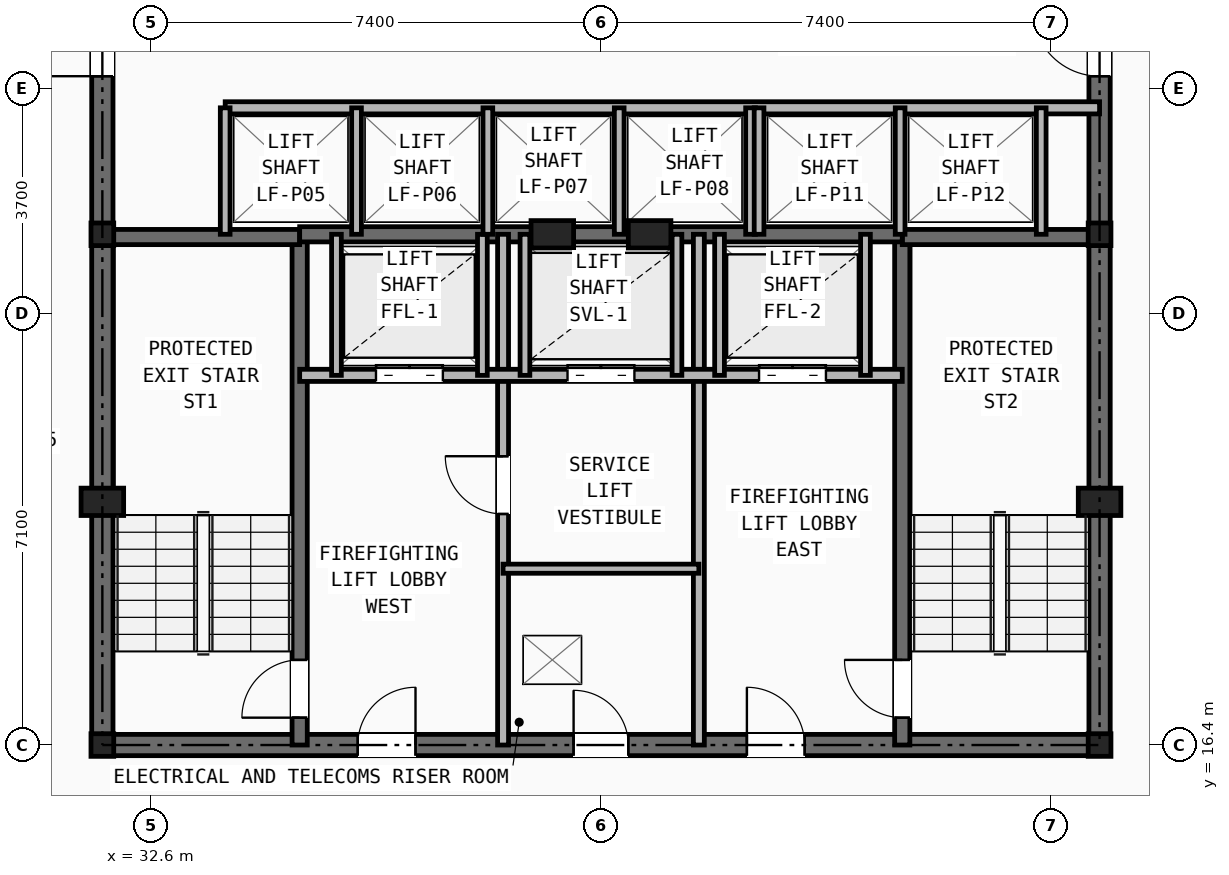
"""IFC4 building model, lengths in metres.
Left out: names, types, materials, properties, quantities, classifications, styles, units other than length and angle.
Written with IfcOpenShell. Run it as: python <this file> out.ifc"""

import sys

from ifc_helpers import new_model, si_unit, direction, frame, frame_2d, origin, origin_2d, place, context, subcontext, project, spatial, rectangle, i_section, extrude, element, fill, save


model = new_model("IFC4")
c1 = context("Model", 3, precision=1e-05, world=origin(), true_north=direction((0.0, 1.0)))
c2 = subcontext(c1, "Body", "Model", "MODEL_VIEW")
j1 = project(units=[si_unit("LENGTHUNIT", "METRE"), si_unit("PLANEANGLEUNIT", "RADIAN")], contexts=[c1])
p1 = place(None, origin())
s1 = spatial("IfcSite", under=j1, at=p1, CompositionType="ELEMENT")
p2 = place(p1, origin())
s2 = spatial("IfcBuilding", under=s1, at=p2, CompositionType="ELEMENT")
p3 = place(p2, frame((0.0, 0.0, 33.6)))
s3 = spatial("IfcBuildingStorey", under=s2, at=p3, CompositionType="ELEMENT", Elevation=33.6)
for number, where, z_axis, x_axis in (
    (1, (31.8, 16.4, 0.0), (0.0, 0.0, 1.0), (1.0, 0.0, 0.0)),
    (2, (48.2, 16.4, 0.0), (0.0, 0.0, 1.0), (1.0, 0.0, 0.0)),
    (3, (31.8, 24.8, 0.0), (0.0, 0.0, 1.0), (1.0, 0.0, 0.0)),
    (4, (48.2, 24.8, 0.0), (0.0, 0.0, 1.0), (1.0, 0.0, 0.0)),
):
    element("IfcColumn", number, at=place(p3, frame(where, z_axis=z_axis, x_axis=x_axis)), inside=s3, PredefinedType="COLUMN", context=c2, shape_type="SweptSolid", body=[
        extrude(i_section(OverallWidth=0.374, OverallDepth=0.372, WebThickness=0.016, FlangeThickness=0.026, at=origin_2d()), origin(), (0.0, 0.0, 1.0), 3.2),
    ])
for number, where, z_axis, x_axis in (
    (5, (31.8, 20.4, 0.0), (0.0, 0.0, 1.0), (1.0, 0.0, 0.0)),
    (6, (48.2, 20.4, 0.0), (0.0, 0.0, 1.0), (1.0, 0.0, 0.0)),
    (7, (39.2, 24.8, 0.0), (0.0, 0.0, 1.0), (1.0, 0.0, 0.0)),
    (8, (40.8, 24.8, 0.0), (0.0, 0.0, 1.0), (1.0, 0.0, 0.0)),
):
    element("IfcColumn", number, at=place(p3, frame(where, z_axis=z_axis, x_axis=x_axis)), inside=s3, PredefinedType="PILASTER", context=c2, shape_type="SweptSolid", body=[
        extrude(rectangle(XDim=0.7, YDim=0.45, at=origin_2d()), origin(), (0.0, 0.0, 1.0), 3.2),
    ])
p4 = place(p3, frame((31.8, 16.4, 0.0), z_axis=(0.0, 0.0, 1.0), x_axis=(1.0, 0.0, 0.0)))
e9 = element("IfcWall", 9, at=p4, inside=s3, PredefinedType="SHEAR", context=c2, shape_type="SweptSolid", body=[
    extrude(rectangle(XDim=16.4, YDim=0.35, at=frame_2d((8.2, 0.0))), origin(), (0.0, 0.0, 1.0), 2.98),
])
p5 = place(p4, frame((7.75, 0.0, 0.0)))
e10 = element("IfcOpeningElement", 10, at=p5, cuts=e9, PredefinedType="OPENING", context=c2, shape_type="SweptSolid", body=[
    extrude(rectangle(XDim=0.9, YDim=2.1, at=frame_2d((0.45, 1.05))), frame((0.0, 0.185, 0.0), z_axis=(0.0, -1.0, 0.0), x_axis=(1.0, 0.0, 0.0)), (0.0, 0.0, 1.0), 0.37),
])
p6 = place(p4, frame((4.2, 0.0, 0.0)))
e11 = element("IfcOpeningElement", 11, at=p6, cuts=e9, PredefinedType="OPENING", context=c2, shape_type="SweptSolid", body=[
    extrude(rectangle(XDim=0.95, YDim=2.1, at=frame_2d((0.475, 1.05))), frame((0.0, 0.185, 0.0), z_axis=(0.0, -1.0, 0.0), x_axis=(1.0, 0.0, 0.0)), (0.0, 0.0, 1.0), 0.37),
])
p7 = place(p4, frame((10.6, 0.0, 0.0)))
e12 = element("IfcOpeningElement", 12, at=p7, cuts=e9, PredefinedType="OPENING", context=c2, shape_type="SweptSolid", body=[
    extrude(rectangle(XDim=0.95, YDim=2.1, at=frame_2d((0.475, 1.05))), frame((0.0, 0.185, 0.0), z_axis=(0.0, -1.0, 0.0), x_axis=(1.0, 0.0, 0.0)), (0.0, 0.0, 1.0), 0.37),
])
p8 = place(p3, frame((31.8, 16.4, 0.0), z_axis=(0.0, 0.0, 1.0), x_axis=(0.0, 1.0, 0.0)))
e13 = element("IfcWall", 13, at=p8, inside=s3, PredefinedType="SHEAR", context=c2, shape_type="SweptSolid", body=[
    extrude(rectangle(XDim=14.8, YDim=0.35, at=frame_2d((7.4, 0.0))), origin(), (0.0, 0.0, 1.0), 2.98),
])
p9 = place(p8, frame((11.0, 0.0, 0.0)))
e14 = element("IfcOpeningElement", 14, at=p9, cuts=e13, PredefinedType="OPENING", context=c2, shape_type="SweptSolid", body=[
    extrude(rectangle(XDim=1.1, YDim=2.15, at=frame_2d((0.55, 1.075))), frame((0.0, 0.185, 0.0), z_axis=(0.0, -1.0, 0.0), x_axis=(1.0, 0.0, 0.0)), (0.0, 0.0, 1.0), 0.37),
])
p10 = place(p3, frame((48.2, 16.4, 0.0), z_axis=(0.0, 0.0, 1.0), x_axis=(0.0, 1.0, 0.0)))
e15 = element("IfcWall", 15, at=p10, inside=s3, PredefinedType="SHEAR", context=c2, shape_type="SweptSolid", body=[
    extrude(rectangle(XDim=14.8, YDim=0.35, at=frame_2d((7.4, 0.0))), origin(), (0.0, 0.0, 1.0), 2.98),
])
p11 = place(p10, frame((11.0, 0.0, 0.0)))
e16 = element("IfcOpeningElement", 16, at=p11, cuts=e15, PredefinedType="OPENING", context=c2, shape_type="SweptSolid", body=[
    extrude(rectangle(XDim=1.1, YDim=2.15, at=frame_2d((0.55, 1.075))), frame((0.0, 0.185, 0.0), z_axis=(0.0, -1.0, 0.0), x_axis=(1.0, 0.0, 0.0)), (0.0, 0.0, 1.0), 0.37),
])
p12 = place(p3, frame((35.045, 16.4, 0.0), z_axis=(0.0, 0.0, 1.0), x_axis=(0.0, 1.0, 0.0)))
e17 = element("IfcWall", 17, at=p12, inside=s3, PredefinedType="SHEAR", context=c2, shape_type="SweptSolid", body=[
    extrude(rectangle(XDim=8.4, YDim=0.25, at=frame_2d((4.2, 0.0))), origin(), (0.0, 0.0, 1.0), 2.98),
])
p13 = place(p12, frame((0.45, 0.0, 0.0)))
e18 = element("IfcOpeningElement", 18, at=p13, cuts=e17, PredefinedType="OPENING", context=c2, shape_type="SweptSolid", body=[
    extrude(rectangle(XDim=0.95, YDim=2.1, at=frame_2d((0.475, 1.05))), frame((0.0, 0.135, 0.0), z_axis=(0.0, -1.0, 0.0), x_axis=(1.0, 0.0, 0.0)), (0.0, 0.0, 1.0), 0.27),
])
p14 = place(p3, frame((31.8, 24.755, 0.0), z_axis=(0.0, 0.0, 1.0), x_axis=(1.0, 0.0, 0.0)))
e19 = element("IfcWall", 19, at=p14, inside=s3, PredefinedType="SHEAR", context=c2, shape_type="SweptSolid", body=[
    extrude(rectangle(XDim=3.245, YDim=0.25, at=frame_2d((1.623, 0.0))), origin(), (0.0, 0.0, 1.0), 2.98),
])
p15 = place(p3, frame((44.955, 16.4, 0.0), z_axis=(0.0, 0.0, 1.0), x_axis=(0.0, 1.0, 0.0)))
e20 = element("IfcWall", 20, at=p15, inside=s3, PredefinedType="SHEAR", context=c2, shape_type="SweptSolid", body=[
    extrude(rectangle(XDim=8.4, YDim=0.25, at=frame_2d((4.2, 0.0))), origin(), (0.0, 0.0, 1.0), 2.98),
])
p16 = place(p15, frame((0.45, 0.0, 0.0)))
e21 = element("IfcOpeningElement", 21, at=p16, cuts=e20, PredefinedType="OPENING", context=c2, shape_type="SweptSolid", body=[
    extrude(rectangle(XDim=0.95, YDim=2.1, at=frame_2d((0.475, 1.05))), frame((0.0, 0.135, 0.0), z_axis=(0.0, -1.0, 0.0), x_axis=(1.0, 0.0, 0.0)), (0.0, 0.0, 1.0), 0.27),
])
p17 = place(p3, frame((44.955, 24.755, 0.0), z_axis=(0.0, 0.0, 1.0), x_axis=(1.0, 0.0, 0.0)))
e22 = element("IfcWall", 22, at=p17, inside=s3, PredefinedType="SHEAR", context=c2, shape_type="SweptSolid", body=[
    extrude(rectangle(XDim=3.245, YDim=0.25, at=frame_2d((1.623, 0.0))), origin(), (0.0, 0.0, 1.0), 2.98),
])
p18 = place(p3, frame((35.045, 24.8, 0.0), z_axis=(0.0, 0.0, 1.0), x_axis=(1.0, 0.0, 0.0)))
e23 = element("IfcWall", 23, at=p18, inside=s3, PredefinedType="SHEAR", context=c2, shape_type="SweptSolid", body=[
    extrude(rectangle(XDim=9.91, YDim=0.25, at=frame_2d((4.955, 0.0))), origin(), (0.0, 0.0, 1.0), 2.98),
])
p19 = place(p3, frame((38.39, 16.4, 0.0), z_axis=(0.0, 0.0, 1.0), x_axis=(0.0, 1.0, 0.0)))
e24 = element("IfcWall", 24, at=p19, inside=s3, PredefinedType="PARTITIONING", context=c2, shape_type="SweptSolid", body=[
    extrude(rectangle(XDim=8.4, YDim=0.18, at=frame_2d((4.2, 0.0))), origin(), (0.0, 0.0, 1.0), 2.431),
])
p20 = place(p19, frame((3.8, 0.0, 0.0)))
e25 = element("IfcOpeningElement", 25, at=p20, cuts=e24, PredefinedType="OPENING", context=c2, shape_type="SweptSolid", body=[
    extrude(rectangle(XDim=0.95, YDim=2.1, at=frame_2d((0.475, 1.05))), frame((0.0, 0.1, 0.0), z_axis=(0.0, -1.0, 0.0), x_axis=(1.0, 0.0, 0.0)), (0.0, 0.0, 1.0), 0.2),
])
p21 = place(p3, frame((41.61, 16.4, 0.0), z_axis=(0.0, 0.0, 1.0), x_axis=(0.0, 1.0, 0.0)))
e26 = element("IfcWall", 26, at=p21, inside=s3, PredefinedType="PARTITIONING", context=c2, shape_type="SweptSolid", body=[
    extrude(rectangle(XDim=8.4, YDim=0.18, at=frame_2d((4.2, 0.0))), origin(), (0.0, 0.0, 1.0), 2.431),
])
p22 = place(p3, frame((35.045, 22.48, 0.0), z_axis=(0.0, 0.0, 1.0), x_axis=(1.0, 0.0, 0.0)))
e27 = element("IfcWall", 27, at=p22, inside=s3, PredefinedType="SOLIDWALL", context=c2, shape_type="SweptSolid", body=[
    extrude(rectangle(XDim=9.91, YDim=0.2, at=frame_2d((4.955, 0.0))), origin(), (0.0, 0.0, 1.0), 2.98),
])
p23 = place(p22, frame((1.255, 0.0, 0.0)))
e28 = element("IfcOpeningElement", 28, at=p23, cuts=e27, PredefinedType="OPENING", context=c2, shape_type="SweptSolid", body=[
    extrude(rectangle(XDim=1.1, YDim=2.15, at=frame_2d((0.55, 1.075))), frame((0.0, 0.11, 0.0), z_axis=(0.0, -1.0, 0.0), x_axis=(1.0, 0.0, 0.0)), (0.0, 0.0, 1.0), 0.22),
])
p24 = place(p22, frame((7.555, 0.0, 0.0)))
e29 = element("IfcOpeningElement", 29, at=p24, cuts=e27, PredefinedType="OPENING", context=c2, shape_type="SweptSolid", body=[
    extrude(rectangle(XDim=1.1, YDim=2.15, at=frame_2d((0.55, 1.075))), frame((0.0, 0.11, 0.0), z_axis=(0.0, -1.0, 0.0), x_axis=(1.0, 0.0, 0.0)), (0.0, 0.0, 1.0), 0.22),
])
p25 = place(p22, frame((4.405, 0.0, 0.0)))
e30 = element("IfcOpeningElement", 30, at=p25, cuts=e27, PredefinedType="OPENING", context=c2, shape_type="SweptSolid", body=[
    extrude(rectangle(XDim=1.1, YDim=2.15, at=frame_2d((0.55, 1.075))), frame((0.0, 0.11, 0.0), z_axis=(0.0, -1.0, 0.0), x_axis=(1.0, 0.0, 0.0)), (0.0, 0.0, 1.0), 0.22),
])
p26 = place(p3, frame((38.39, 19.3, 0.0), z_axis=(0.0, 0.0, 1.0), x_axis=(1.0, 0.0, 0.0)))
e31 = element("IfcWall", 31, at=p26, inside=s3, PredefinedType="PARTITIONING", context=c2, shape_type="SweptSolid", body=[
    extrude(rectangle(XDim=3.22, YDim=0.15, at=frame_2d((1.61, 0.0))), origin(), (0.0, 0.0, 1.0), 2.98),
])
for number, where, z_axis, x_axis in (
    (32, (35.65, 22.48, 0.0), (0.0, 0.0, 1.0), (0.0, 1.0, 0.0)),
    (33, (38.05, 22.48, 0.0), (0.0, 0.0, 1.0), (0.0, 1.0, 0.0)),
    (34, (41.95, 22.48, 0.0), (0.0, 0.0, 1.0), (0.0, 1.0, 0.0)),
    (35, (44.35, 22.48, 0.0), (0.0, 0.0, 1.0), (0.0, 1.0, 0.0)),
    (36, (38.75, 22.48, 0.0), (0.0, 0.0, 1.0), (0.0, 1.0, 0.0)),
    (37, (41.25, 22.48, 0.0), (0.0, 0.0, 1.0), (0.0, 1.0, 0.0)),
):
    element("IfcWall", number, at=place(p3, frame(where, z_axis=z_axis, x_axis=x_axis)), inside=s3, PredefinedType="SOLIDWALL", context=c2, shape_type="SweptSolid", body=[
        extrude(rectangle(XDim=2.32, YDim=0.16, at=frame_2d((1.16, 0.0))), origin(), (0.0, 0.0, 1.0), 2.98),
    ])
p27 = place(p3, frame((33.82, 26.88, 0.0), z_axis=(0.0, 0.0, 1.0), x_axis=(1.0, 0.0, 0.0)))
e38 = element("IfcWall", 38, at=p27, inside=s3, PredefinedType="SOLIDWALL", context=c2, shape_type="SweptSolid", body=[
    extrude(rectangle(XDim=14.38, YDim=0.2, at=frame_2d((7.19, 0.0))), origin(), (0.0, 0.0, 1.0), 2.431),
])
for number, where, z_axis, x_axis in (
    (39, (33.82, 24.8, 0.0), (0.0, 0.0, 1.0), (0.0, 1.0, 0.0)),
    (40, (35.98, 24.8, 0.0), (0.0, 0.0, 1.0), (0.0, 1.0, 0.0)),
    (41, (38.14, 24.8, 0.0), (0.0, 0.0, 1.0), (0.0, 1.0, 0.0)),
    (42, (40.3, 24.8, 0.0), (0.0, 0.0, 1.0), (0.0, 1.0, 0.0)),
    (43, (42.46, 24.8, 0.0), (0.0, 0.0, 1.0), (0.0, 1.0, 0.0)),
    (44, (42.6, 24.8, 0.0), (0.0, 0.0, 1.0), (0.0, 1.0, 0.0)),
    (45, (44.92, 24.8, 0.0), (0.0, 0.0, 1.0), (0.0, 1.0, 0.0)),
    (46, (47.24, 24.8, 0.0), (0.0, 0.0, 1.0), (0.0, 1.0, 0.0)),
):
    element("IfcWall", number, at=place(p3, frame(where, z_axis=z_axis, x_axis=x_axis)), inside=s3, PredefinedType="SOLIDWALL", context=c2, shape_type="SweptSolid", body=[
        extrude(rectangle(XDim=2.08, YDim=0.16, at=frame_2d((1.04, 0.0))), origin(), (0.0, 0.0, 1.0), 2.98),
    ])
p28 = place(p5, origin())
e47 = element("IfcDoor", 47, at=p28, inside=s3, OperationType="SINGLE_SWING_LEFT", PredefinedType="DOOR", context=c2, shape_type="SweptSolid", body=[
    extrude(rectangle(XDim=0.9, YDim=2.1, at=frame_2d((0.45, 1.05))), frame((0.0, 0.025, 0.0), z_axis=(0.0, -1.0, 0.0), x_axis=(1.0, 0.0, 0.0)), (0.0, 0.0, 1.0), 0.05),
])
fill(e10, e47)
p29 = place(p20, origin())
e48 = element("IfcDoor", 48, at=p29, inside=s3, OperationType="SINGLE_SWING_RIGHT", PredefinedType="DOOR", context=c2, shape_type="SweptSolid", body=[
    extrude(rectangle(XDim=0.95, YDim=2.1, at=frame_2d((0.475, 1.05))), frame((0.0, 0.025, 0.0), z_axis=(0.0, -1.0, 0.0), x_axis=(1.0, 0.0, 0.0)), (0.0, 0.0, 1.0), 0.05),
])
fill(e25, e48)
p30 = place(p13, origin())
e49 = element("IfcDoor", 49, at=p30, inside=s3, OperationType="SINGLE_SWING_LEFT", PredefinedType="DOOR", context=c2, shape_type="SweptSolid", body=[
    extrude(rectangle(XDim=0.95, YDim=2.1, at=frame_2d((0.475, 1.05))), frame((0.0, 0.025, 0.0), z_axis=(0.0, -1.0, 0.0), x_axis=(1.0, 0.0, 0.0)), (0.0, 0.0, 1.0), 0.05),
])
fill(e18, e49)
p31 = place(p16, origin())
e50 = element("IfcDoor", 50, at=p31, inside=s3, OperationType="SINGLE_SWING_RIGHT", PredefinedType="DOOR", context=c2, shape_type="SweptSolid", body=[
    extrude(rectangle(XDim=0.95, YDim=2.1, at=frame_2d((0.475, 1.05))), frame((0.0, 0.025, 0.0), z_axis=(0.0, -1.0, 0.0), x_axis=(1.0, 0.0, 0.0)), (0.0, 0.0, 1.0), 0.05),
])
fill(e21, e50)
p32 = place(p6, origin())
e51 = element("IfcDoor", 51, at=p32, inside=s3, OperationType="SINGLE_SWING_RIGHT", PredefinedType="DOOR", context=c2, shape_type="SweptSolid", body=[
    extrude(rectangle(XDim=0.95, YDim=2.1, at=frame_2d((0.475, 1.05))), frame((0.0, 0.025, 0.0), z_axis=(0.0, -1.0, 0.0), x_axis=(1.0, 0.0, 0.0)), (0.0, 0.0, 1.0), 0.05),
])
fill(e11, e51)
p33 = place(p7, origin())
e52 = element("IfcDoor", 52, at=p33, inside=s3, OperationType="SINGLE_SWING_LEFT", PredefinedType="DOOR", context=c2, shape_type="SweptSolid", body=[
    extrude(rectangle(XDim=0.95, YDim=2.1, at=frame_2d((0.475, 1.05))), frame((0.0, 0.025, 0.0), z_axis=(0.0, -1.0, 0.0), x_axis=(1.0, 0.0, 0.0)), (0.0, 0.0, 1.0), 0.05),
])
fill(e12, e52)
p34 = place(p23, origin())
e53 = element("IfcDoor", 53, at=p34, inside=s3, OperationType="DOUBLE_DOOR_SLIDING", PredefinedType="DOOR", context=c2, shape_type="SweptSolid", body=[
    extrude(rectangle(XDim=1.1, YDim=2.15, at=frame_2d((0.55, 1.075))), frame((0.0, 0.025, 0.0), z_axis=(0.0, -1.0, 0.0), x_axis=(1.0, 0.0, 0.0)), (0.0, 0.0, 1.0), 0.05),
])
fill(e28, e53)
p35 = place(p24, origin())
e54 = element("IfcDoor", 54, at=p35, inside=s3, OperationType="DOUBLE_DOOR_SLIDING", PredefinedType="DOOR", context=c2, shape_type="SweptSolid", body=[
    extrude(rectangle(XDim=1.1, YDim=2.15, at=frame_2d((0.55, 1.075))), frame((0.0, 0.025, 0.0), z_axis=(0.0, -1.0, 0.0), x_axis=(1.0, 0.0, 0.0)), (0.0, 0.0, 1.0), 0.05),
])
fill(e29, e54)
p36 = place(p25, origin())
e55 = element("IfcDoor", 55, at=p36, inside=s3, OperationType="DOUBLE_DOOR_SLIDING", PredefinedType="DOOR", context=c2, shape_type="SweptSolid", body=[
    extrude(rectangle(XDim=1.1, YDim=2.15, at=frame_2d((0.55, 1.075))), frame((0.0, 0.025, 0.0), z_axis=(0.0, -1.0, 0.0), x_axis=(1.0, 0.0, 0.0)), (0.0, 0.0, 1.0), 0.05),
])
fill(e30, e55)
p37 = place(p9, origin())
e56 = element("IfcDoor", 56, at=p37, inside=s3, OperationType="SINGLE_SWING_LEFT", PredefinedType="DOOR", context=c2, shape_type="SweptSolid", body=[
    extrude(rectangle(XDim=1.1, YDim=2.15, at=frame_2d((0.55, 1.075))), frame((0.0, 0.025, 0.0), z_axis=(0.0, -1.0, 0.0), x_axis=(1.0, 0.0, 0.0)), (0.0, 0.0, 1.0), 0.05),
])
fill(e14, e56)
p38 = place(p11, origin())
e57 = element("IfcDoor", 57, at=p38, inside=s3, OperationType="SINGLE_SWING_RIGHT", PredefinedType="DOOR", context=c2, shape_type="SweptSolid", body=[
    extrude(rectangle(XDim=1.1, YDim=2.15, at=frame_2d((0.55, 1.075))), frame((0.0, 0.025, 0.0), z_axis=(0.0, -1.0, 0.0), x_axis=(1.0, 0.0, 0.0)), (0.0, 0.0, 1.0), 0.05),
])
fill(e16, e57)
save(model, sys.argv[1])
